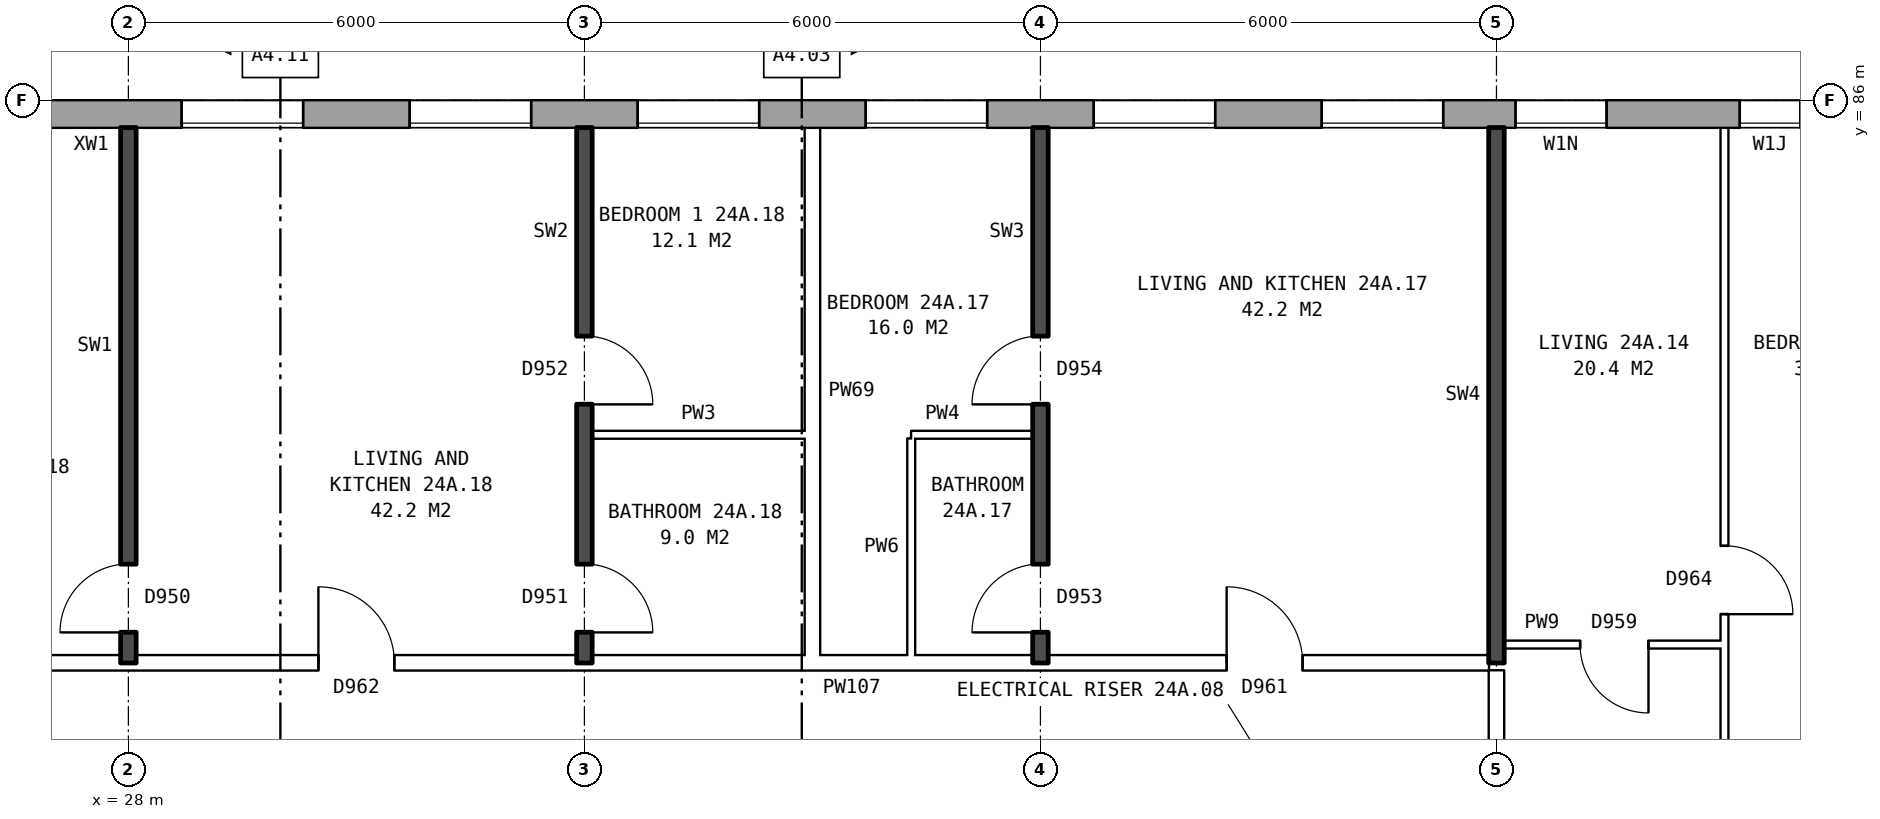
"""IFC4 building model, lengths in metres.
Left out: names, types, materials, properties, quantities, classifications, styles, units other than length and angle.
Written with IfcOpenShell. Run it as: python <this file> out.ifc"""

import sys

from ifc_helpers import new_model, si_unit, direction, frame, frame_2d, origin, place, context, subcontext, project, spatial, rectangle, extrude, element, fill, save


model = new_model("IFC4")
c1 = context("Model", 3, precision=1e-05, world=origin(), true_north=direction((0.0, 1.0)))
c2 = subcontext(c1, "Body", "Model", "MODEL_VIEW")
j1 = project(units=[si_unit("LENGTHUNIT", "METRE"), si_unit("PLANEANGLEUNIT", "RADIAN")], contexts=[c1])
p1 = place(None, origin())
s1 = spatial("IfcSite", under=j1, at=p1, CompositionType="ELEMENT")
p2 = place(p1, origin())
s2 = spatial("IfcBuilding", under=s1, at=p2, CompositionType="ELEMENT")
p3 = place(p2, frame((0.0, 0.0, 87.1)))
s3 = spatial("IfcBuildingStorey", under=s2, at=p3, CompositionType="ELEMENT", Elevation=87.1)
p4 = place(p3, frame((72.925, 85.82, 0.0), z_axis=(0.0, 0.0, 1.0), x_axis=(-1.0, 0.0, 0.0)))
e1 = element("IfcWall", 1, at=p4, inside=s3, PredefinedType="STANDARD", context=c2, shape_type="SweptSolid", body=[
    extrude(rectangle(XDim=46.601, YDim=0.36, at=frame_2d((23.3, 0.0))), origin(), (0.0, 0.0, 1.0), 2.85),
])
p5 = place(p4, frame((0.625, 0.0, 0.8)))
e2 = element("IfcOpeningElement", 2, at=p5, cuts=e1, PredefinedType="OPENING", context=c2, shape_type="SweptSolid", body=[
    extrude(rectangle(XDim=1.6, YDim=1.8, at=frame_2d((0.8, 0.9))), frame((0.0, 0.19, 0.0), z_axis=(0.0, -1.0, 0.0), x_axis=(1.0, 0.0, 0.0)), (0.0, 0.0, 1.0), 0.38),
])
p6 = place(p4, frame((3.625, 0.0, 0.8)))
e3 = element("IfcOpeningElement", 3, at=p6, cuts=e1, PredefinedType="OPENING", context=c2, shape_type="SweptSolid", body=[
    extrude(rectangle(XDim=1.6, YDim=1.8, at=frame_2d((0.8, 0.9))), frame((0.0, 0.19, 0.0), z_axis=(0.0, -1.0, 0.0), x_axis=(1.0, 0.0, 0.0)), (0.0, 0.0, 1.0), 0.38),
])
p7 = place(p4, frame((6.625, 0.0, 0.8)))
e4 = element("IfcOpeningElement", 4, at=p7, cuts=e1, PredefinedType="OPENING", context=c2, shape_type="SweptSolid", body=[
    extrude(rectangle(XDim=1.6, YDim=1.8, at=frame_2d((0.8, 0.9))), frame((0.0, 0.19, 0.0), z_axis=(0.0, -1.0, 0.0), x_axis=(1.0, 0.0, 0.0)), (0.0, 0.0, 1.0), 0.38),
])
p8 = place(p4, frame((9.625, 0.0, 0.8)))
e5 = element("IfcOpeningElement", 5, at=p8, cuts=e1, PredefinedType="OPENING", context=c2, shape_type="SweptSolid", body=[
    extrude(rectangle(XDim=1.6, YDim=1.8, at=frame_2d((0.8, 0.9))), frame((0.0, 0.19, 0.0), z_axis=(0.0, -1.0, 0.0), x_axis=(1.0, 0.0, 0.0)), (0.0, 0.0, 1.0), 0.38),
])
p9 = place(p4, frame((12.625, 0.0, 0.8)))
e6 = element("IfcOpeningElement", 6, at=p9, cuts=e1, PredefinedType="OPENING", context=c2, shape_type="SweptSolid", body=[
    extrude(rectangle(XDim=1.6, YDim=1.8, at=frame_2d((0.8, 0.9))), frame((0.0, 0.19, 0.0), z_axis=(0.0, -1.0, 0.0), x_axis=(1.0, 0.0, 0.0)), (0.0, 0.0, 1.0), 0.38),
])
p10 = place(p4, frame((15.625, 0.0, 0.8)))
e7 = element("IfcOpeningElement", 7, at=p10, cuts=e1, PredefinedType="OPENING", context=c2, shape_type="SweptSolid", body=[
    extrude(rectangle(XDim=1.6, YDim=1.8, at=frame_2d((0.8, 0.9))), frame((0.0, 0.19, 0.0), z_axis=(0.0, -1.0, 0.0), x_axis=(1.0, 0.0, 0.0)), (0.0, 0.0, 1.0), 0.38),
])
p11 = place(p4, frame((18.625, 0.0, 0.8)))
e8 = element("IfcOpeningElement", 8, at=p11, cuts=e1, PredefinedType="OPENING", context=c2, shape_type="SweptSolid", body=[
    extrude(rectangle(XDim=1.6, YDim=1.8, at=frame_2d((0.8, 0.9))), frame((0.0, 0.19, 0.0), z_axis=(0.0, -1.0, 0.0), x_axis=(1.0, 0.0, 0.0)), (0.0, 0.0, 1.0), 0.38),
])
p12 = place(p4, frame((22.025, 0.0, 0.15)))
e9 = element("IfcOpeningElement", 9, at=p12, cuts=e1, PredefinedType="OPENING", context=c2, shape_type="SweptSolid", body=[
    extrude(rectangle(XDim=0.6, YDim=0.9, at=frame_2d((0.3, 0.45))), frame((0.0, 0.19, 0.0), z_axis=(0.0, -1.0, 0.0), x_axis=(1.0, 0.0, 0.0)), (0.0, 0.0, 1.0), 0.38),
])
p13 = place(p4, frame((25.475, 0.0, 1.4)))
e10 = element("IfcOpeningElement", 10, at=p13, cuts=e1, PredefinedType="OPENING", context=c2, shape_type="SweptSolid", body=[
    extrude(rectangle(XDim=1.2, YDim=1.2, at=frame_2d((0.6, 0.6))), frame((0.0, 0.19, 0.0), z_axis=(0.0, -1.0, 0.0), x_axis=(1.0, 0.0, 0.0)), (0.0, 0.0, 1.0), 0.38),
])
p14 = place(p4, frame((27.625, 0.0, 0.8)))
e11 = element("IfcOpeningElement", 11, at=p14, cuts=e1, PredefinedType="OPENING", context=c2, shape_type="SweptSolid", body=[
    extrude(rectangle(XDim=1.6, YDim=1.8, at=frame_2d((0.8, 0.9))), frame((0.0, 0.19, 0.0), z_axis=(0.0, -1.0, 0.0), x_axis=(1.0, 0.0, 0.0)), (0.0, 0.0, 1.0), 0.38),
])
p15 = place(p4, frame((30.625, 0.0, 0.8)))
e12 = element("IfcOpeningElement", 12, at=p15, cuts=e1, PredefinedType="OPENING", context=c2, shape_type="SweptSolid", body=[
    extrude(rectangle(XDim=1.6, YDim=1.8, at=frame_2d((0.8, 0.9))), frame((0.0, 0.19, 0.0), z_axis=(0.0, -1.0, 0.0), x_axis=(1.0, 0.0, 0.0)), (0.0, 0.0, 1.0), 0.38),
])
p16 = place(p4, frame((33.625, 0.0, 0.8)))
e13 = element("IfcOpeningElement", 13, at=p16, cuts=e1, PredefinedType="OPENING", context=c2, shape_type="SweptSolid", body=[
    extrude(rectangle(XDim=1.6, YDim=1.8, at=frame_2d((0.8, 0.9))), frame((0.0, 0.19, 0.0), z_axis=(0.0, -1.0, 0.0), x_axis=(1.0, 0.0, 0.0)), (0.0, 0.0, 1.0), 0.38),
])
p17 = place(p4, frame((36.625, 0.0, 0.8)))
e14 = element("IfcOpeningElement", 14, at=p17, cuts=e1, PredefinedType="OPENING", context=c2, shape_type="SweptSolid", body=[
    extrude(rectangle(XDim=1.6, YDim=1.8, at=frame_2d((0.8, 0.9))), frame((0.0, 0.19, 0.0), z_axis=(0.0, -1.0, 0.0), x_axis=(1.0, 0.0, 0.0)), (0.0, 0.0, 1.0), 0.38),
])
p18 = place(p4, frame((39.625, 0.0, 0.8)))
e15 = element("IfcOpeningElement", 15, at=p18, cuts=e1, PredefinedType="OPENING", context=c2, shape_type="SweptSolid", body=[
    extrude(rectangle(XDim=1.6, YDim=1.8, at=frame_2d((0.8, 0.9))), frame((0.0, 0.19, 0.0), z_axis=(0.0, -1.0, 0.0), x_axis=(1.0, 0.0, 0.0)), (0.0, 0.0, 1.0), 0.38),
])
p19 = place(p4, frame((42.625, 0.0, 0.8)))
e16 = element("IfcOpeningElement", 16, at=p19, cuts=e1, PredefinedType="OPENING", context=c2, shape_type="SweptSolid", body=[
    extrude(rectangle(XDim=1.6, YDim=1.8, at=frame_2d((0.8, 0.9))), frame((0.0, 0.19, 0.0), z_axis=(0.0, -1.0, 0.0), x_axis=(1.0, 0.0, 0.0)), (0.0, 0.0, 1.0), 0.38),
])
p20 = place(p4, frame((22.925, 0.0, 0.25)))
e17 = element("IfcOpeningElement", 17, at=p20, cuts=e1, PredefinedType="OPENING", context=c2, shape_type="SweptSolid", body=[
    extrude(rectangle(XDim=0.8, YDim=1.5, at=frame_2d((0.4, 0.75))), frame((0.0, 0.19, 0.0), z_axis=(0.0, -1.0, 0.0), x_axis=(1.0, 0.0, 0.0)), (0.0, 0.0, 1.0), 0.38),
])
p21 = place(p3, frame((23.61, 78.6, 0.0), z_axis=(0.0, 0.0, 1.0), x_axis=(1.0, 0.0, 0.0)))
e18 = element("IfcWall", 18, at=p21, inside=s3, PredefinedType="PARTITIONING", context=c2, shape_type="SweptSolid", body=[
    extrude(rectangle(XDim=22.29, YDim=0.2, at=frame_2d((11.145, 0.0))), origin(), (0.0, 0.0, 1.0), 2.85),
])
p22 = place(p21, frame((18.84, 0.0, 0.0)))
e19 = element("IfcOpeningElement", 19, at=p22, cuts=e18, PredefinedType="OPENING", context=c2, shape_type="SweptSolid", body=[
    extrude(rectangle(XDim=1.0, YDim=2.1, at=frame_2d((0.5, 1.05))), frame((0.0, 0.11, 0.0), z_axis=(0.0, -1.0, 0.0), x_axis=(1.0, 0.0, 0.0)), (0.0, 0.0, 1.0), 0.22),
])
p23 = place(p21, frame((6.89, 0.0, 0.0)))
e20 = element("IfcOpeningElement", 20, at=p23, cuts=e18, PredefinedType="OPENING", context=c2, shape_type="SweptSolid", body=[
    extrude(rectangle(XDim=1.0, YDim=2.1, at=frame_2d((0.5, 1.05))), frame((0.0, 0.11, 0.0), z_axis=(0.0, -1.0, 0.0), x_axis=(1.0, 0.0, 0.0)), (0.0, 0.0, 1.0), 0.22),
])
p24 = place(p3, frame((46.1, 78.84, 0.0), z_axis=(0.0, 0.0, 1.0), x_axis=(1.0, 0.0, 0.0)))
e21 = element("IfcWall", 21, at=p24, inside=s3, PredefinedType="PARTITIONING", context=c2, shape_type="SweptSolid", body=[
    extrude(rectangle(XDim=2.9, YDim=0.1, at=frame_2d((1.45, 0.0))), origin(), (0.0, 0.0, 1.0), 2.85),
])
p25 = place(p24, frame((1.0, 0.0, 0.0)))
e22 = element("IfcOpeningElement", 22, at=p25, cuts=e21, PredefinedType="OPENING", context=c2, shape_type="SweptSolid", body=[
    extrude(rectangle(XDim=0.9, YDim=2.1, at=frame_2d((0.45, 1.05))), frame((0.0, 0.06, 0.0), z_axis=(0.0, -1.0, 0.0), x_axis=(1.0, 0.0, 0.0)), (0.0, 0.0, 1.0), 0.12),
])
p26 = place(p3, frame((34.1, 81.6, 0.0), z_axis=(0.0, 0.0, 1.0), x_axis=(1.0, 0.0, 0.0)))
e23 = element("IfcWall", 23, at=p26, inside=s3, PredefinedType="PARTITIONING", context=c2, shape_type="SweptSolid", body=[
    extrude(rectangle(XDim=2.8, YDim=0.1, at=frame_2d((1.4, 0.0))), origin(), (0.0, 0.0, 1.0), 2.85),
])
p27 = place(p3, frame((38.3, 81.6, 0.0), z_axis=(0.0, 0.0, 1.0), x_axis=(1.0, 0.0, 0.0)))
e24 = element("IfcWall", 24, at=p27, inside=s3, PredefinedType="PARTITIONING", context=c2, shape_type="SweptSolid", body=[
    extrude(rectangle(XDim=1.6, YDim=0.1, at=frame_2d((0.8, 0.0))), origin(), (0.0, 0.0, 1.0), 2.85),
])
p28 = place(p3, frame((28.0, 78.6, 0.0), z_axis=(0.0, 0.0, 1.0), x_axis=(0.0, 1.0, 0.0)))
e25 = element("IfcWall", 25, at=p28, inside=s3, PredefinedType="SOLIDWALL", context=c2, shape_type="SweptSolid", body=[
    extrude(rectangle(XDim=7.04, YDim=0.2, at=frame_2d((3.52, 0.0))), origin(), (0.0, 0.0, 1.0), 2.85),
])
p29 = place(p28, frame((0.4, 0.0, 0.0)))
e26 = element("IfcOpeningElement", 26, at=p29, cuts=e25, PredefinedType="OPENING", context=c2, shape_type="SweptSolid", body=[
    extrude(rectangle(XDim=0.9, YDim=2.1, at=frame_2d((0.45, 1.05))), frame((0.0, 0.11, 0.0), z_axis=(0.0, -1.0, 0.0), x_axis=(1.0, 0.0, 0.0)), (0.0, 0.0, 1.0), 0.22),
])
p30 = place(p3, frame((34.0, 78.6, 0.0), z_axis=(0.0, 0.0, 1.0), x_axis=(0.0, 1.0, 0.0)))
e27 = element("IfcWall", 27, at=p30, inside=s3, PredefinedType="SOLIDWALL", context=c2, shape_type="SweptSolid", body=[
    extrude(rectangle(XDim=7.04, YDim=0.2, at=frame_2d((3.52, 0.0))), origin(), (0.0, 0.0, 1.0), 2.85),
])
p31 = place(p30, frame((3.4, 0.0, 0.0)))
e28 = element("IfcOpeningElement", 28, at=p31, cuts=e27, PredefinedType="OPENING", context=c2, shape_type="SweptSolid", body=[
    extrude(rectangle(XDim=0.9, YDim=2.1, at=frame_2d((0.45, 1.05))), frame((0.0, 0.11, 0.0), z_axis=(0.0, -1.0, 0.0), x_axis=(1.0, 0.0, 0.0)), (0.0, 0.0, 1.0), 0.22),
])
p32 = place(p30, frame((0.4, 0.0, 0.0)))
e29 = element("IfcOpeningElement", 29, at=p32, cuts=e27, PredefinedType="OPENING", context=c2, shape_type="SweptSolid", body=[
    extrude(rectangle(XDim=0.9, YDim=2.1, at=frame_2d((0.45, 1.05))), frame((0.0, 0.11, 0.0), z_axis=(0.0, -1.0, 0.0), x_axis=(1.0, 0.0, 0.0)), (0.0, 0.0, 1.0), 0.22),
])
p33 = place(p3, frame((37.0, 78.7, 0.0), z_axis=(0.0, 0.0, 1.0), x_axis=(0.0, 1.0, 0.0)))
e30 = element("IfcWall", 30, at=p33, inside=s3, PredefinedType="PARTITIONING", context=c2, shape_type="SweptSolid", body=[
    extrude(rectangle(XDim=6.94, YDim=0.2, at=frame_2d((3.47, 0.0))), origin(), (0.0, 0.0, 1.0), 2.85),
])
p34 = place(p3, frame((38.3, 78.7, 0.0), z_axis=(0.0, 0.0, 1.0), x_axis=(0.0, 1.0, 0.0)))
e31 = element("IfcWall", 31, at=p34, inside=s3, PredefinedType="PARTITIONING", context=c2, shape_type="SweptSolid", body=[
    extrude(rectangle(XDim=2.85, YDim=0.1, at=frame_2d((1.425, 0.0))), origin(), (0.0, 0.0, 1.0), 2.85),
])
p35 = place(p3, frame((40.0, 78.6, 0.0), z_axis=(0.0, 0.0, 1.0), x_axis=(0.0, 1.0, 0.0)))
e32 = element("IfcWall", 32, at=p35, inside=s3, PredefinedType="SOLIDWALL", context=c2, shape_type="SweptSolid", body=[
    extrude(rectangle(XDim=7.04, YDim=0.2, at=frame_2d((3.52, 0.0))), origin(), (0.0, 0.0, 1.0), 2.85),
])
p36 = place(p35, frame((3.4, 0.0, 0.0)))
e33 = element("IfcOpeningElement", 33, at=p36, cuts=e32, PredefinedType="OPENING", context=c2, shape_type="SweptSolid", body=[
    extrude(rectangle(XDim=0.9, YDim=2.1, at=frame_2d((0.45, 1.05))), frame((0.0, 0.11, 0.0), z_axis=(0.0, -1.0, 0.0), x_axis=(1.0, 0.0, 0.0)), (0.0, 0.0, 1.0), 0.22),
])
p37 = place(p35, frame((0.4, 0.0, 0.0)))
e34 = element("IfcOpeningElement", 34, at=p37, cuts=e32, PredefinedType="OPENING", context=c2, shape_type="SweptSolid", body=[
    extrude(rectangle(XDim=0.9, YDim=2.1, at=frame_2d((0.45, 1.05))), frame((0.0, 0.11, 0.0), z_axis=(0.0, -1.0, 0.0), x_axis=(1.0, 0.0, 0.0)), (0.0, 0.0, 1.0), 0.22),
])
p38 = place(p3, frame((46.0, 76.3, 0.0), z_axis=(0.0, 0.0, 1.0), x_axis=(0.0, 1.0, 0.0)))
e35 = element("IfcWall", 35, at=p38, inside=s3, PredefinedType="PARTITIONING", context=c2, shape_type="SweptSolid", body=[
    extrude(rectangle(XDim=2.2, YDim=0.2, at=frame_2d((1.1, 0.0))), origin(), (0.0, 0.0, 1.0), 2.85),
])
p39 = place(p3, frame((46.0, 78.6, 0.0), z_axis=(0.0, 0.0, 1.0), x_axis=(0.0, 1.0, 0.0)))
e36 = element("IfcWall", 36, at=p39, inside=s3, PredefinedType="SOLIDWALL", context=c2, shape_type="SweptSolid", body=[
    extrude(rectangle(XDim=7.04, YDim=0.2, at=frame_2d((3.52, 0.0))), origin(), (0.0, 0.0, 1.0), 2.85),
])
p40 = place(p3, frame((49.0, 71.3, 0.0), z_axis=(0.0, 0.0, 1.0), x_axis=(0.0, 1.0, 0.0)))
e37 = element("IfcWall", 37, at=p40, inside=s3, PredefinedType="PARTITIONING", context=c2, shape_type="SweptSolid", body=[
    extrude(rectangle(XDim=14.34, YDim=0.1, at=frame_2d((7.17, 0.0))), origin(), (0.0, 0.0, 1.0), 2.85),
])
p41 = place(p40, frame((7.94, 0.0, 0.0)))
e38 = element("IfcOpeningElement", 38, at=p41, cuts=e37, PredefinedType="OPENING", context=c2, shape_type="SweptSolid", body=[
    extrude(rectangle(XDim=0.9, YDim=2.1, at=frame_2d((0.45, 1.05))), frame((0.0, 0.06, 0.0), z_axis=(0.0, -1.0, 0.0), x_axis=(1.0, 0.0, 0.0)), (0.0, 0.0, 1.0), 0.12),
])
p42 = place(p40, frame((0.4, 0.0, 0.0)))
e39 = element("IfcOpeningElement", 39, at=p42, cuts=e37, PredefinedType="OPENING", context=c2, shape_type="SweptSolid", body=[
    extrude(rectangle(XDim=0.9, YDim=2.1, at=frame_2d((0.45, 1.05))), frame((0.0, 0.06, 0.0), z_axis=(0.0, -1.0, 0.0), x_axis=(1.0, 0.0, 0.0)), (0.0, 0.0, 1.0), 0.12),
])
p43 = place(p13, origin())
e40 = element("IfcWindow", 40, at=p43, inside=s3, PartitioningType="SINGLE_PANEL", PredefinedType="WINDOW", context=c2, shape_type="SweptSolid", body=[
    extrude(rectangle(XDim=1.2, YDim=1.2, at=frame_2d((0.6, 0.6))), frame((0.0, 0.15, 0.0), z_axis=(0.0, -1.0, 0.0), x_axis=(1.0, 0.0, 0.0)), (0.0, 0.0, 1.0), 0.06),
])
fill(e10, e40)
p44 = place(p14, origin())
e41 = element("IfcWindow", 41, at=p44, inside=s3, PartitioningType="SINGLE_PANEL", PredefinedType="WINDOW", context=c2, shape_type="SweptSolid", body=[
    extrude(rectangle(XDim=1.6, YDim=1.8, at=frame_2d((0.8, 0.9))), frame((0.0, 0.15, 0.0), z_axis=(0.0, -1.0, 0.0), x_axis=(1.0, 0.0, 0.0)), (0.0, 0.0, 1.0), 0.06),
])
fill(e11, e41)
p45 = place(p15, origin())
e42 = element("IfcWindow", 42, at=p45, inside=s3, PartitioningType="SINGLE_PANEL", PredefinedType="WINDOW", context=c2, shape_type="SweptSolid", body=[
    extrude(rectangle(XDim=1.6, YDim=1.8, at=frame_2d((0.8, 0.9))), frame((0.0, 0.15, 0.0), z_axis=(0.0, -1.0, 0.0), x_axis=(1.0, 0.0, 0.0)), (0.0, 0.0, 1.0), 0.06),
])
fill(e12, e42)
p46 = place(p16, origin())
e43 = element("IfcWindow", 43, at=p46, inside=s3, PartitioningType="SINGLE_PANEL", PredefinedType="WINDOW", context=c2, shape_type="SweptSolid", body=[
    extrude(rectangle(XDim=1.6, YDim=1.8, at=frame_2d((0.8, 0.9))), frame((0.0, 0.15, 0.0), z_axis=(0.0, -1.0, 0.0), x_axis=(1.0, 0.0, 0.0)), (0.0, 0.0, 1.0), 0.06),
])
fill(e13, e43)
p47 = place(p17, origin())
e44 = element("IfcWindow", 44, at=p47, inside=s3, PartitioningType="SINGLE_PANEL", PredefinedType="WINDOW", context=c2, shape_type="SweptSolid", body=[
    extrude(rectangle(XDim=1.6, YDim=1.8, at=frame_2d((0.8, 0.9))), frame((0.0, 0.15, 0.0), z_axis=(0.0, -1.0, 0.0), x_axis=(1.0, 0.0, 0.0)), (0.0, 0.0, 1.0), 0.06),
])
fill(e14, e44)
p48 = place(p18, origin())
e45 = element("IfcWindow", 45, at=p48, inside=s3, PartitioningType="SINGLE_PANEL", PredefinedType="WINDOW", context=c2, shape_type="SweptSolid", body=[
    extrude(rectangle(XDim=1.6, YDim=1.8, at=frame_2d((0.8, 0.9))), frame((0.0, 0.15, 0.0), z_axis=(0.0, -1.0, 0.0), x_axis=(1.0, 0.0, 0.0)), (0.0, 0.0, 1.0), 0.06),
])
fill(e15, e45)
p49 = place(p19, origin())
e46 = element("IfcWindow", 46, at=p49, inside=s3, PartitioningType="SINGLE_PANEL", PredefinedType="WINDOW", context=c2, shape_type="SweptSolid", body=[
    extrude(rectangle(XDim=1.6, YDim=1.8, at=frame_2d((0.8, 0.9))), frame((0.0, 0.15, 0.0), z_axis=(0.0, -1.0, 0.0), x_axis=(1.0, 0.0, 0.0)), (0.0, 0.0, 1.0), 0.06),
])
fill(e16, e46)
p50 = place(p41, frame((0.9, 0.0, 0.0), z_axis=(0.0, 0.0, 1.0), x_axis=(-1.0, 0.0, 0.0)))
e47 = element("IfcDoor", 47, at=p50, inside=s3, OperationType="SINGLE_SWING_RIGHT", PredefinedType="DOOR", context=c2, shape_type="SweptSolid", body=[
    extrude(rectangle(XDim=0.9, YDim=2.1, at=frame_2d((0.45, 1.05))), frame((0.0, 0.025, 0.0), z_axis=(0.0, -1.0, 0.0), x_axis=(1.0, 0.0, 0.0)), (0.0, 0.0, 1.0), 0.05),
])
fill(e38, e47)
p51 = place(p25, frame((0.9, 0.0, 0.0), z_axis=(0.0, 0.0, 1.0), x_axis=(-1.0, 0.0, 0.0)))
e48 = element("IfcDoor", 48, at=p51, inside=s3, OperationType="SINGLE_SWING_LEFT", PredefinedType="DOOR", context=c2, shape_type="SweptSolid", body=[
    extrude(rectangle(XDim=0.9, YDim=2.1, at=frame_2d((0.45, 1.05))), frame((0.0, 0.025, 0.0), z_axis=(0.0, -1.0, 0.0), x_axis=(1.0, 0.0, 0.0)), (0.0, 0.0, 1.0), 0.05),
])
fill(e22, e48)
p52 = place(p36, origin())
e49 = element("IfcDoor", 49, at=p52, inside=s3, OperationType="SINGLE_SWING_LEFT", PredefinedType="DOOR", context=c2, shape_type="SweptSolid", body=[
    extrude(rectangle(XDim=0.9, YDim=2.1, at=frame_2d((0.45, 1.05))), frame((0.0, 0.025, 0.0), z_axis=(0.0, -1.0, 0.0), x_axis=(1.0, 0.0, 0.0)), (0.0, 0.0, 1.0), 0.05),
])
fill(e33, e49)
p53 = place(p22, origin())
e50 = element("IfcDoor", 50, at=p53, inside=s3, OperationType="SINGLE_SWING_LEFT", PredefinedType="DOOR", context=c2, shape_type="SweptSolid", body=[
    extrude(rectangle(XDim=1.0, YDim=2.1, at=frame_2d((0.5, 1.05))), frame((0.0, 0.025, 0.0), z_axis=(0.0, -1.0, 0.0), x_axis=(1.0, 0.0, 0.0)), (0.0, 0.0, 1.0), 0.05),
])
fill(e19, e50)
p54 = place(p37, origin())
e51 = element("IfcDoor", 51, at=p54, inside=s3, OperationType="SINGLE_SWING_LEFT", PredefinedType="DOOR", context=c2, shape_type="SweptSolid", body=[
    extrude(rectangle(XDim=0.9, YDim=2.1, at=frame_2d((0.45, 1.05))), frame((0.0, 0.025, 0.0), z_axis=(0.0, -1.0, 0.0), x_axis=(1.0, 0.0, 0.0)), (0.0, 0.0, 1.0), 0.05),
])
fill(e34, e51)
p55 = place(p31, frame((0.9, 0.0, 0.0), z_axis=(0.0, 0.0, 1.0), x_axis=(-1.0, 0.0, 0.0)))
e52 = element("IfcDoor", 52, at=p55, inside=s3, OperationType="SINGLE_SWING_RIGHT", PredefinedType="DOOR", context=c2, shape_type="SweptSolid", body=[
    extrude(rectangle(XDim=0.9, YDim=2.1, at=frame_2d((0.45, 1.05))), frame((0.0, 0.025, 0.0), z_axis=(0.0, -1.0, 0.0), x_axis=(1.0, 0.0, 0.0)), (0.0, 0.0, 1.0), 0.05),
])
fill(e28, e52)
p56 = place(p29, origin())
e53 = element("IfcDoor", 53, at=p56, inside=s3, OperationType="SINGLE_SWING_LEFT", PredefinedType="DOOR", context=c2, shape_type="SweptSolid", body=[
    extrude(rectangle(XDim=0.9, YDim=2.1, at=frame_2d((0.45, 1.05))), frame((0.0, 0.025, 0.0), z_axis=(0.0, -1.0, 0.0), x_axis=(1.0, 0.0, 0.0)), (0.0, 0.0, 1.0), 0.05),
])
fill(e26, e53)
p57 = place(p23, origin())
e54 = element("IfcDoor", 54, at=p57, inside=s3, OperationType="SINGLE_SWING_LEFT", PredefinedType="DOOR", context=c2, shape_type="SweptSolid", body=[
    extrude(rectangle(XDim=1.0, YDim=2.1, at=frame_2d((0.5, 1.05))), frame((0.0, 0.025, 0.0), z_axis=(0.0, -1.0, 0.0), x_axis=(1.0, 0.0, 0.0)), (0.0, 0.0, 1.0), 0.05),
])
fill(e20, e54)
p58 = place(p32, frame((0.9, 0.0, 0.0), z_axis=(0.0, 0.0, 1.0), x_axis=(-1.0, 0.0, 0.0)))
e55 = element("IfcDoor", 55, at=p58, inside=s3, OperationType="SINGLE_SWING_RIGHT", PredefinedType="DOOR", context=c2, shape_type="SweptSolid", body=[
    extrude(rectangle(XDim=0.9, YDim=2.1, at=frame_2d((0.45, 1.05))), frame((0.0, 0.025, 0.0), z_axis=(0.0, -1.0, 0.0), x_axis=(1.0, 0.0, 0.0)), (0.0, 0.0, 1.0), 0.05),
])
fill(e29, e55)
p59 = place(p20, origin())
e56 = element("IfcWindow", 56, at=p59, inside=s3, PartitioningType="SINGLE_PANEL", PredefinedType="WINDOW", context=c2, shape_type="SweptSolid", body=[
    extrude(rectangle(XDim=0.8, YDim=1.5, at=frame_2d((0.4, 0.75))), frame((0.0, 0.15, 0.0), z_axis=(0.0, -1.0, 0.0), x_axis=(1.0, 0.0, 0.0)), (0.0, 0.0, 1.0), 0.06),
])
fill(e17, e56)
save(model, sys.argv[1])
